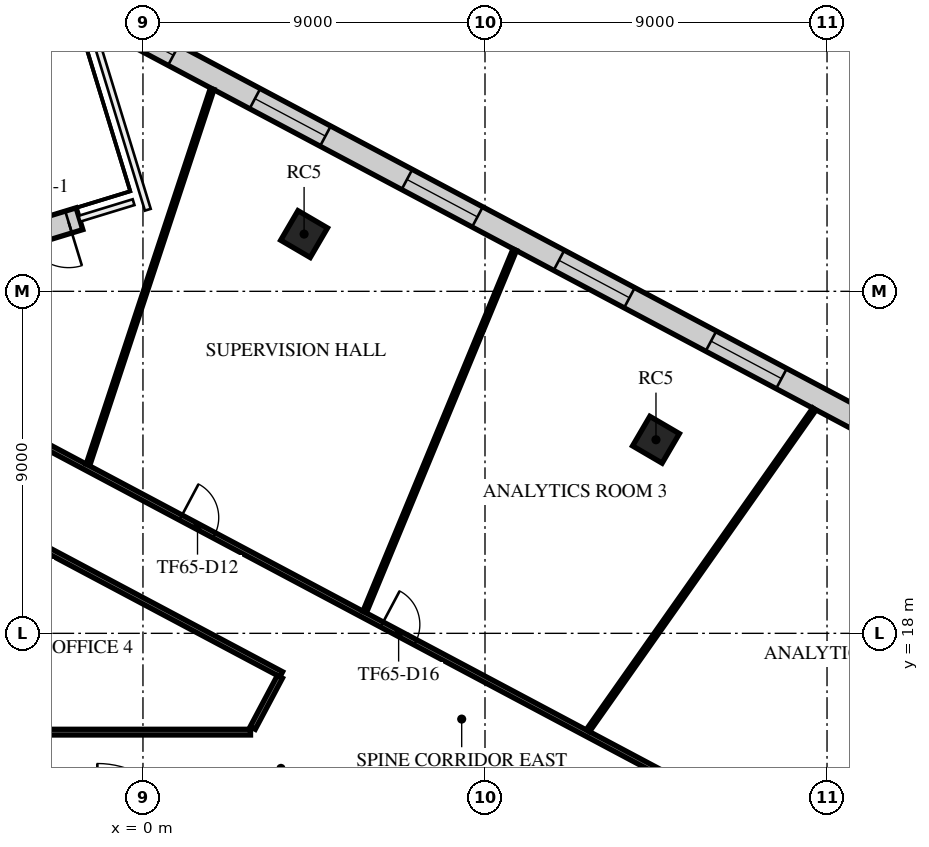
"""IFC4 building model, lengths in metres.
Left out: names, types, materials, properties, quantities, classifications, styles, units other than length and angle.
Written with IfcOpenShell. Run it as: python <this file> out.ifc"""

import sys

from ifc_helpers import new_model, si_unit, direction, frame, frame_2d, origin, origin_2d, place, context, subcontext, project, spatial, rectangle, extrude, element, fill, save


model = new_model("IFC4")
c1 = context("Model", 3, precision=1e-05, world=origin(), true_north=direction((0.0, 1.0)))
c2 = subcontext(c1, "Body", "Model", "MODEL_VIEW")
j1 = project(units=[si_unit("LENGTHUNIT", "METRE"), si_unit("PLANEANGLEUNIT", "RADIAN")], contexts=[c1])
p1 = place(None, origin())
s1 = spatial("IfcSite", under=j1, at=p1, CompositionType="ELEMENT")
p2 = place(p1, origin())
s2 = spatial("IfcBuilding", under=s1, at=p2, CompositionType="ELEMENT")
p3 = place(p2, frame((0.0, 0.0, 274.9)))
s3 = spatial("IfcBuildingStorey", under=s2, at=p3, CompositionType="ELEMENT", Elevation=274.9)
for number, where, z_axis, x_axis in (
    (1, (13.499, 23.094, 0.0), (0.0, 0.0, 1.0), (0.505, 0.863, 0.0)),
    (2, (4.24, 28.506, 0.0), (0.0, 0.0, 1.0), (0.505, 0.863, 0.0)),
):
    element("IfcColumn", number, at=place(p3, frame(where, z_axis=z_axis, x_axis=x_axis)), inside=s3, PredefinedType="COLUMN", context=c2, shape_type="SweptSolid", body=[
        extrude(rectangle(XDim=0.9, YDim=0.9, at=origin_2d()), origin(), (0.0, 0.0, 1.0), 4.0),
    ])
p4 = place(p3, frame((29.875, 17.753, 0.0), z_axis=(0.0, 0.0, 1.0), x_axis=(-0.88294707281, 0.469472540854, 0.0)))
e3 = element("IfcWall", 3, at=p4, inside=s3, PredefinedType="STANDARD", context=c2, shape_type="SweptSolid", body=[
    extrude(rectangle(XDim=36.243, YDim=0.6, at=frame_2d((18.122, 0.0))), origin(), (0.0, 0.0, 1.0), 3.64),
])
p5 = place(p4, frame((1.215, 0.0, 0.9)))
e4 = element("IfcOpeningElement", 4, at=p5, cuts=e3, PredefinedType="OPENING", context=c2, shape_type="SweptSolid", body=[
    extrude(rectangle(XDim=2.1, YDim=2.1, at=frame_2d((1.05, 1.05))), frame((0.0, 0.31, 0.0), z_axis=(0.0, -1.0, 0.0), x_axis=(1.0, 0.0, 0.0)), (0.0, 0.0, 1.0), 0.62),
])
p6 = place(p4, frame((5.746, 0.0, 0.9)))
e5 = element("IfcOpeningElement", 5, at=p6, cuts=e3, PredefinedType="OPENING", context=c2, shape_type="SweptSolid", body=[
    extrude(rectangle(XDim=2.1, YDim=2.1, at=frame_2d((1.05, 1.05))), frame((0.0, 0.31, 0.0), z_axis=(0.0, -1.0, 0.0), x_axis=(1.0, 0.0, 0.0)), (0.0, 0.0, 1.0), 0.62),
])
p7 = place(p4, frame((10.276, 0.0, 0.9)))
e6 = element("IfcOpeningElement", 6, at=p7, cuts=e3, PredefinedType="OPENING", context=c2, shape_type="SweptSolid", body=[
    extrude(rectangle(XDim=2.1, YDim=2.1, at=frame_2d((1.05, 1.05))), frame((0.0, 0.31, 0.0), z_axis=(0.0, -1.0, 0.0), x_axis=(1.0, 0.0, 0.0)), (0.0, 0.0, 1.0), 0.62),
])
p8 = place(p4, frame((14.806, 0.0, 0.9)))
e7 = element("IfcOpeningElement", 7, at=p8, cuts=e3, PredefinedType="OPENING", context=c2, shape_type="SweptSolid", body=[
    extrude(rectangle(XDim=2.1, YDim=2.1, at=frame_2d((1.05, 1.05))), frame((0.0, 0.31, 0.0), z_axis=(0.0, -1.0, 0.0), x_axis=(1.0, 0.0, 0.0)), (0.0, 0.0, 1.0), 0.62),
])
p9 = place(p4, frame((19.337, 0.0, 0.9)))
e8 = element("IfcOpeningElement", 8, at=p9, cuts=e3, PredefinedType="OPENING", context=c2, shape_type="SweptSolid", body=[
    extrude(rectangle(XDim=2.1, YDim=2.1, at=frame_2d((1.05, 1.05))), frame((0.0, 0.31, 0.0), z_axis=(0.0, -1.0, 0.0), x_axis=(1.0, 0.0, 0.0)), (0.0, 0.0, 1.0), 0.62),
])
p10 = place(p4, frame((23.867, 0.0, 0.9)))
e9 = element("IfcOpeningElement", 9, at=p10, cuts=e3, PredefinedType="OPENING", context=c2, shape_type="SweptSolid", body=[
    extrude(rectangle(XDim=2.1, YDim=2.1, at=frame_2d((1.05, 1.05))), frame((0.0, 0.31, 0.0), z_axis=(0.0, -1.0, 0.0), x_axis=(1.0, 0.0, 0.0)), (0.0, 0.0, 1.0), 0.62),
])
p11 = place(p4, frame((28.398, 0.0, 0.9)))
e10 = element("IfcOpeningElement", 10, at=p11, cuts=e3, PredefinedType="OPENING", context=c2, shape_type="SweptSolid", body=[
    extrude(rectangle(XDim=2.1, YDim=2.1, at=frame_2d((1.05, 1.05))), frame((0.0, 0.31, 0.0), z_axis=(0.0, -1.0, 0.0), x_axis=(1.0, 0.0, 0.0)), (0.0, 0.0, 1.0), 0.62),
])
p12 = place(p4, frame((32.928, 0.0, 0.9)))
e11 = element("IfcOpeningElement", 11, at=p12, cuts=e3, PredefinedType="OPENING", context=c2, shape_type="SweptSolid", body=[
    extrude(rectangle(XDim=2.1, YDim=2.1, at=frame_2d((1.05, 1.05))), frame((0.0, 0.31, 0.0), z_axis=(0.0, -1.0, 0.0), x_axis=(1.0, 0.0, 0.0)), (0.0, 0.0, 1.0), 0.62),
])
p13 = place(p3, frame((-1.671, 28.911, 0.0), z_axis=(0.0, 0.0, 1.0), x_axis=(-0.956293645939, -0.292408041504, 0.0)))
e12 = element("IfcWall", 12, at=p13, inside=s3, PredefinedType="STANDARD", context=c2, shape_type="SweptSolid", body=[
    extrude(rectangle(XDim=1.8, YDim=0.6, at=frame_2d((0.9, 0.0))), origin(), (0.0, 0.0, 1.0), 3.64),
])
p14 = place(p13, frame((0.3, 0.0, 0.0)))
e13 = element("IfcOpeningElement", 13, at=p14, cuts=e12, PredefinedType="OPENING", context=c2, shape_type="SweptSolid", body=[
    extrude(rectangle(XDim=1.2, YDim=2.4, at=frame_2d((0.6, 1.2))), frame((0.0, 0.31, 0.0), z_axis=(0.0, -1.0, 0.0), x_axis=(1.0, 0.0, 0.0)), (0.0, 0.0, 1.0), 0.62),
])
p15 = place(p3, frame((-15.325, 15.4, 0.0), z_axis=(0.0, 0.0, 1.0), x_axis=(1.0, 0.0, 0.0)))
e14 = element("IfcWall", 14, at=p15, inside=s3, PredefinedType="PARTITIONING", context=c2, shape_type="SweptSolid", body=[
    extrude(rectangle(XDim=18.155, YDim=0.15, at=frame_2d((9.078, 0.0))), origin(), (0.0, 0.0, 1.0), 3.24),
])
p16 = place(p15, frame((2.8, 0.0, 0.0)))
e15 = element("IfcOpeningElement", 15, at=p16, cuts=e14, PredefinedType="OPENING", context=c2, shape_type="SweptSolid", body=[
    extrude(rectangle(XDim=1.8, YDim=2.1, at=frame_2d((0.9, 1.05))), frame((0.0, 0.085, 0.0), z_axis=(0.0, -1.0, 0.0), x_axis=(1.0, 0.0, 0.0)), (0.0, 0.0, 1.0), 0.17),
])
p17 = place(p3, frame((-9.512, 23.914, 0.0), z_axis=(0.0, 0.0, 1.0), x_axis=(0.882964773335, -0.469439249583, 0.0)))
e16 = element("IfcWall", 16, at=p17, inside=s3, PredefinedType="PARTITIONING", context=c2, shape_type="SweptSolid", body=[
    extrude(rectangle(XDim=14.894, YDim=0.15, at=frame_2d((7.447, 0.0))), origin(), (0.0, 0.0, 1.0), 3.04),
])
p18 = place(p17, frame((2.296, 0.0, 0.0)))
e17 = element("IfcOpeningElement", 17, at=p18, cuts=e16, PredefinedType="OPENING", context=c2, shape_type="SweptSolid", body=[
    extrude(rectangle(XDim=1.0, YDim=2.1, at=frame_2d((0.5, 1.05))), frame((0.0, 0.085, 0.0), z_axis=(0.0, -1.0, 0.0), x_axis=(1.0, 0.0, 0.0)), (0.0, 0.0, 1.0), 0.17),
])
p19 = place(p17, frame((6.307, 0.0, 0.0)))
e18 = element("IfcOpeningElement", 18, at=p19, cuts=e16, PredefinedType="OPENING", context=c2, shape_type="SweptSolid", body=[
    extrude(rectangle(XDim=1.0, YDim=2.1, at=frame_2d((0.5, 1.05))), frame((0.0, 0.085, 0.0), z_axis=(0.0, -1.0, 0.0), x_axis=(1.0, 0.0, 0.0)), (0.0, 0.0, 1.0), 0.17),
])
p20 = place(p3, frame((-8.385, 26.033, 0.0), z_axis=(0.0, 0.0, 1.0), x_axis=(0.882949433839, -0.46946810039, 0.0)))
e19 = element("IfcWall", 19, at=p20, inside=s3, PredefinedType="PARTITIONING", context=c2, shape_type="SweptSolid", body=[
    extrude(rectangle(XDim=39.325, YDim=0.15, at=frame_2d((19.662, 0.0))), origin(), (0.0, 0.0, 1.0), 3.04),
])
p21 = place(p20, frame((10.622, 0.0, 0.0)))
e20 = element("IfcOpeningElement", 20, at=p21, cuts=e19, PredefinedType="OPENING", context=c2, shape_type="SweptSolid", body=[
    extrude(rectangle(XDim=1.0, YDim=2.1, at=frame_2d((0.5, 1.05))), frame((0.0, 0.085, 0.0), z_axis=(0.0, -1.0, 0.0), x_axis=(1.0, 0.0, 0.0)), (0.0, 0.0, 1.0), 0.17),
])
p22 = place(p20, frame((16.615, 0.0, 0.0)))
e21 = element("IfcOpeningElement", 21, at=p22, cuts=e19, PredefinedType="OPENING", context=c2, shape_type="SweptSolid", body=[
    extrude(rectangle(XDim=1.0, YDim=2.1, at=frame_2d((0.5, 1.05))), frame((0.0, 0.085, 0.0), z_axis=(0.0, -1.0, 0.0), x_axis=(1.0, 0.0, 0.0)), (0.0, 0.0, 1.0), 0.17),
])
p23 = place(p20, frame((28.254, 0.0, 0.0)))
e22 = element("IfcOpeningElement", 22, at=p23, cuts=e19, PredefinedType="OPENING", context=c2, shape_type="SweptSolid", body=[
    extrude(rectangle(XDim=1.0, YDim=2.1, at=frame_2d((0.5, 1.05))), frame((0.0, 0.085, 0.0), z_axis=(0.0, -1.0, 0.0), x_axis=(1.0, 0.0, 0.0)), (0.0, 0.0, 1.0), 0.17),
])
p24 = place(p3, frame((2.889, 15.51, 0.0), z_axis=(0.0, 0.0, 1.0), x_axis=(0.469315326783, 0.883030647286, 0.0)))
e23 = element("IfcWall", 23, at=p24, inside=s3, PredefinedType="PARTITIONING", context=c2, shape_type="SweptSolid", body=[
    extrude(rectangle(XDim=1.524, YDim=0.15, at=frame_2d((0.762, 0.0))), origin(), (0.0, 0.0, 1.0), 3.24),
])
p25 = place(p3, frame((-1.445, 22.438, 0.0), z_axis=(0.0, 0.0, 1.0), x_axis=(0.313673627087, 0.949530860831, 0.0)))
e24 = element("IfcWall", 24, at=p25, inside=s3, PredefinedType="PARTITIONING", context=c2, shape_type="SweptSolid", body=[
    extrude(rectangle(XDim=10.414, YDim=0.1, at=frame_2d((5.207, 0.0))), origin(), (0.0, 0.0, 1.0), 3.04),
])
p26 = place(p3, frame((5.835, 18.563, 0.0), z_axis=(0.0, 0.0, 1.0), x_axis=(0.382702237667, 0.923871742876, 0.0)))
e25 = element("IfcWall", 25, at=p26, inside=s3, PredefinedType="PARTITIONING", context=c2, shape_type="SweptSolid", body=[
    extrude(rectangle(XDim=10.316, YDim=0.1, at=frame_2d((5.158, 0.0))), origin(), (0.0, 0.0, 1.0), 3.04),
])
p27 = place(p3, frame((11.709, 15.441, 0.0), z_axis=(0.0, 0.0, 1.0), x_axis=(0.575721307139, 0.817645997058, 0.0)))
e26 = element("IfcWall", 26, at=p27, inside=s3, PredefinedType="PARTITIONING", context=c2, shape_type="SweptSolid", body=[
    extrude(rectangle(XDim=10.348, YDim=0.1, at=frame_2d((5.174, 0.0))), origin(), (0.0, 0.0, 1.0), 3.04),
])
p28 = place(p8, origin())
e27 = element("IfcWindow", 27, at=p28, inside=s3, PartitioningType="SINGLE_PANEL", PredefinedType="WINDOW", context=c2, shape_type="SweptSolid", body=[
    extrude(rectangle(XDim=2.1, YDim=2.1, at=frame_2d((1.05, 1.05))), frame((0.0, 0.03, 0.0), z_axis=(0.0, -1.0, 0.0), x_axis=(1.0, 0.0, 0.0)), (0.0, 0.0, 1.0), 0.06),
])
fill(e7, e27)
p29 = place(p9, origin())
e28 = element("IfcWindow", 28, at=p29, inside=s3, PartitioningType="SINGLE_PANEL", PredefinedType="WINDOW", context=c2, shape_type="SweptSolid", body=[
    extrude(rectangle(XDim=2.1, YDim=2.1, at=frame_2d((1.05, 1.05))), frame((0.0, 0.03, 0.0), z_axis=(0.0, -1.0, 0.0), x_axis=(1.0, 0.0, 0.0)), (0.0, 0.0, 1.0), 0.06),
])
fill(e8, e28)
p30 = place(p10, origin())
e29 = element("IfcWindow", 29, at=p30, inside=s3, PartitioningType="SINGLE_PANEL", PredefinedType="WINDOW", context=c2, shape_type="SweptSolid", body=[
    extrude(rectangle(XDim=2.1, YDim=2.1, at=frame_2d((1.05, 1.05))), frame((0.0, 0.03, 0.0), z_axis=(0.0, -1.0, 0.0), x_axis=(1.0, 0.0, 0.0)), (0.0, 0.0, 1.0), 0.06),
])
fill(e9, e29)
p31 = place(p11, origin())
e30 = element("IfcWindow", 30, at=p31, inside=s3, PartitioningType="SINGLE_PANEL", PredefinedType="WINDOW", context=c2, shape_type="SweptSolid", body=[
    extrude(rectangle(XDim=2.1, YDim=2.1, at=frame_2d((1.05, 1.05))), frame((0.0, 0.03, 0.0), z_axis=(0.0, -1.0, 0.0), x_axis=(1.0, 0.0, 0.0)), (0.0, 0.0, 1.0), 0.06),
])
fill(e10, e30)
p32 = place(p12, origin())
e31 = element("IfcWindow", 31, at=p32, inside=s3, PartitioningType="SINGLE_PANEL", PredefinedType="WINDOW", context=c2, shape_type="SweptSolid", body=[
    extrude(rectangle(XDim=2.1, YDim=2.1, at=frame_2d((1.05, 1.05))), frame((0.0, 0.03, 0.0), z_axis=(0.0, -1.0, 0.0), x_axis=(1.0, 0.0, 0.0)), (0.0, 0.0, 1.0), 0.06),
])
fill(e11, e31)
p33 = place(p14, origin())
e32 = element("IfcDoor", 32, at=p33, inside=s3, OperationType="SINGLE_SWING_LEFT", PredefinedType="DOOR", context=c2, shape_type="SweptSolid", body=[
    extrude(rectangle(XDim=1.2, YDim=2.4, at=frame_2d((0.6, 1.2))), frame((0.0, 0.025, 0.0), z_axis=(0.0, -1.0, 0.0), x_axis=(1.0, 0.0, 0.0)), (0.0, 0.0, 1.0), 0.05),
])
fill(e13, e32)
p34 = place(p21, origin())
e33 = element("IfcDoor", 33, at=p34, inside=s3, OperationType="SINGLE_SWING_RIGHT", PredefinedType="DOOR", context=c2, shape_type="SweptSolid", body=[
    extrude(rectangle(XDim=1.0, YDim=2.1, at=frame_2d((0.5, 1.05))), frame((0.0, 0.025, 0.0), z_axis=(0.0, -1.0, 0.0), x_axis=(1.0, 0.0, 0.0)), (0.0, 0.0, 1.0), 0.05),
])
fill(e20, e33)
p35 = place(p22, origin())
e34 = element("IfcDoor", 34, at=p35, inside=s3, OperationType="SINGLE_SWING_LEFT", PredefinedType="DOOR", context=c2, shape_type="SweptSolid", body=[
    extrude(rectangle(XDim=1.0, YDim=2.1, at=frame_2d((0.5, 1.05))), frame((0.0, 0.025, 0.0), z_axis=(0.0, -1.0, 0.0), x_axis=(1.0, 0.0, 0.0)), (0.0, 0.0, 1.0), 0.05),
])
fill(e21, e34)
save(model, sys.argv[1])
